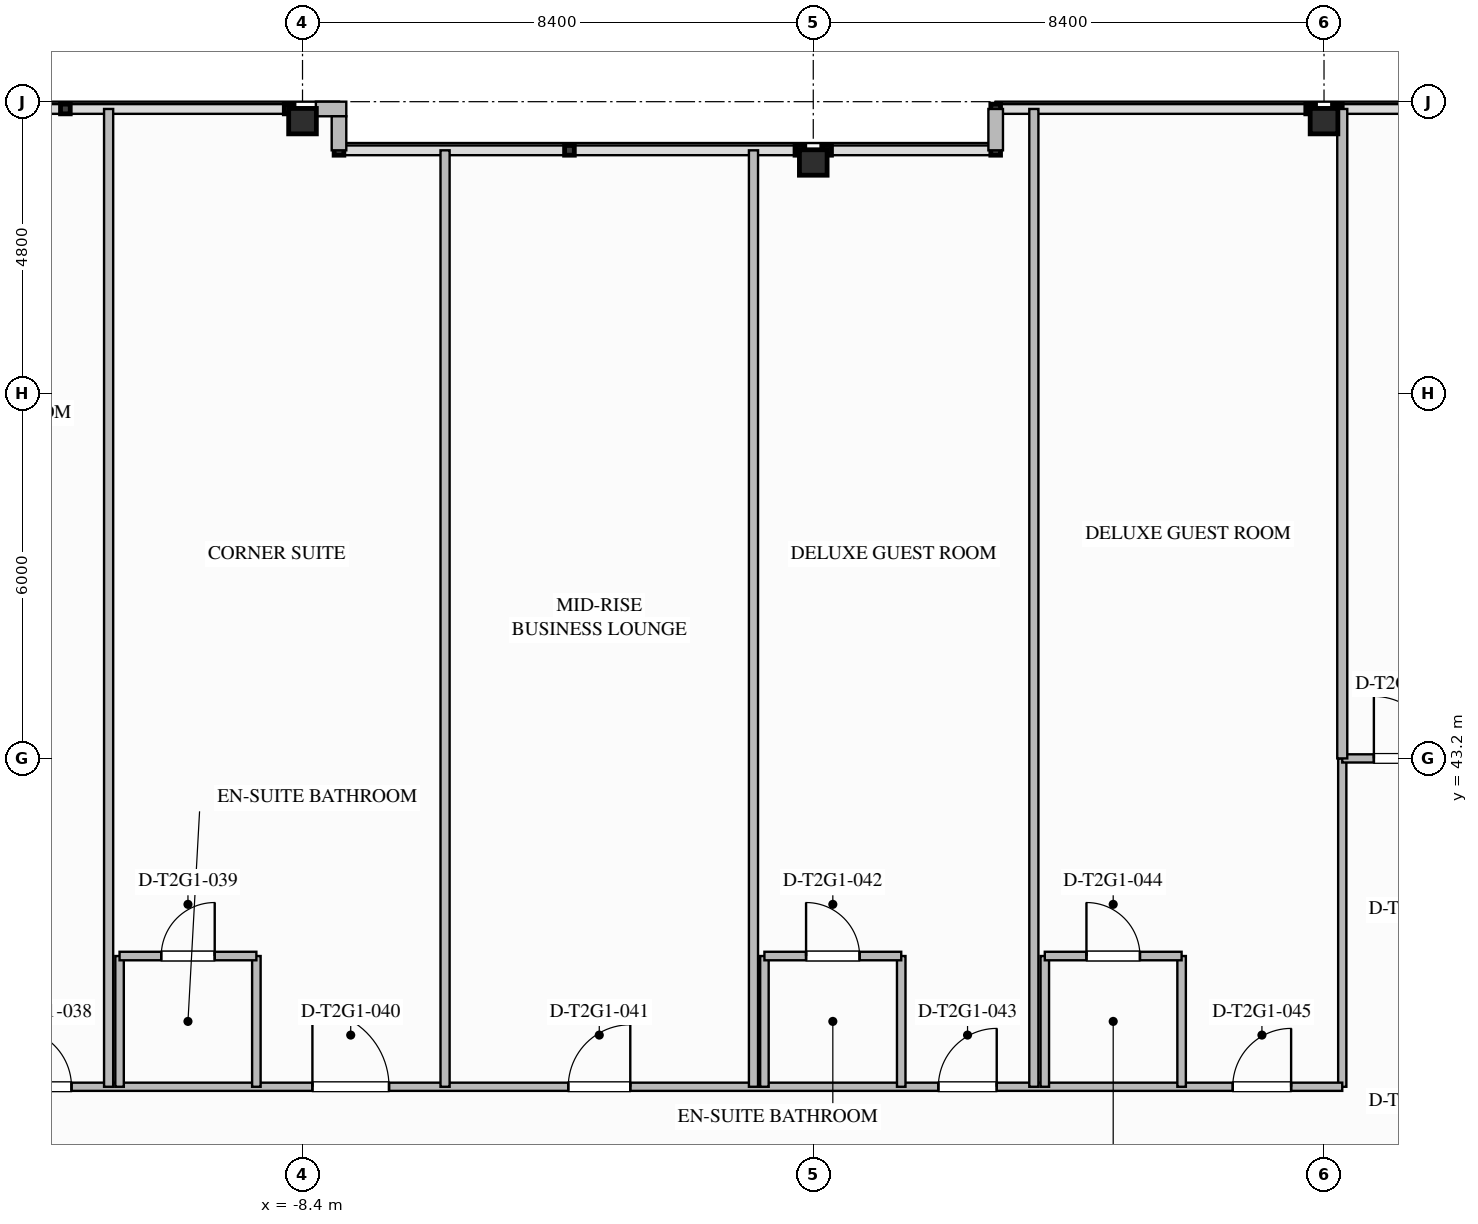
"""IFC4 building model, lengths in metres.
Left out: names, types, materials, properties, quantities, classifications, styles, units other than length and angle.
Written with IfcOpenShell. Run it as: python <this file> out.ifc"""

import sys

from ifc_helpers import new_model, si_unit, direction, frame, frame_2d, origin, origin_2d, place, context, subcontext, project, spatial, rectangle, i_section, extrude, element, fill, save


model = new_model("IFC4")
c1 = context("Model", 3, precision=1e-05, world=origin(), true_north=direction((0.0, 1.0)))
c2 = subcontext(c1, "Body", "Model", "MODEL_VIEW")
j1 = project(units=[si_unit("LENGTHUNIT", "METRE"), si_unit("PLANEANGLEUNIT", "RADIAN")], contexts=[c1])
p1 = place(None, origin())
s1 = spatial("IfcSite", under=j1, at=p1, CompositionType="ELEMENT")
p2 = place(p1, origin())
s2 = spatial("IfcBuilding", under=s1, at=p2, CompositionType="ELEMENT")
p3 = place(p2, frame((0.0, 0.0, 91.8)))
s3 = spatial("IfcBuildingStorey", under=s2, at=p3, CompositionType="ELEMENT", Elevation=91.8)
for number, where, z_axis, x_axis in (
    (1, (-8.4, 53.68, 0.0), (0.0, 0.0, 1.0), (0.0, 1.0, 0.0)),
    (2, (0.0, 53.0, 0.0), (0.0, 0.0, 1.0), (0.0, 1.0, 0.0)),
    (3, (8.4, 53.68, 0.0), (0.0, 0.0, 1.0), (0.0, 1.0, 0.0)),
):
    element("IfcColumn", number, at=place(p3, frame(where, z_axis=z_axis, x_axis=x_axis)), inside=s3, PredefinedType="COLUMN", context=c2, shape_type="SweptSolid", body=[
        extrude(i_section(OverallWidth=0.418, OverallDepth=0.455, WebThickness=0.042, FlangeThickness=0.068, FilletRadius=0.03, at=origin_2d()), origin(), (0.0, 0.0, 1.0), 3.497),
    ])
p4 = place(p3, frame((-8.18, 53.88, 0.0), z_axis=(0.0, 0.0, 1.0), x_axis=(1.0, 0.0, 0.0)))
e4 = element("IfcWall", 4, at=p4, inside=s3, PredefinedType="STANDARD", context=c2, shape_type="SweptSolid", body=[
    extrude(rectangle(XDim=0.5, YDim=0.24, at=frame_2d((0.25, 0.0))), origin(), (0.0, 0.0, 1.0), 3.24),
])
p5 = place(p3, frame((-7.8, 53.76, 0.0), z_axis=(0.0, 0.0, 1.0), x_axis=(0.0, -1.0, 0.0)))
e5 = element("IfcWall", 5, at=p5, inside=s3, PredefinedType="STANDARD", context=c2, shape_type="SweptSolid", body=[
    extrude(rectangle(XDim=0.56, YDim=0.24, at=frame_2d((0.28, 0.0))), origin(), (0.0, 0.0, 1.0), 3.24),
])
p6 = place(p3, frame((3.0, 53.2, 0.0), z_axis=(0.0, 0.0, 1.0), x_axis=(0.0, 1.0, 0.0)))
e6 = element("IfcWall", 6, at=p6, inside=s3, PredefinedType="STANDARD", context=c2, shape_type="SweptSolid", body=[
    extrude(rectangle(XDim=0.68, YDim=0.24, at=frame_2d((0.34, 0.0))), origin(), (0.0, 0.0, 1.0), 3.24),
])
p7 = place(p3, frame((8.7, 37.8, 0.0), z_axis=(0.0, 0.0, 1.0), x_axis=(0.0, 1.0, 0.0)))
e7 = element("IfcWall", 7, at=p7, inside=s3, PredefinedType="PARTITIONING", context=c2, shape_type="SweptSolid", body=[
    extrude(rectangle(XDim=5.4, YDim=0.135, at=frame_2d((2.7, 0.0))), origin(), (0.0, 0.0, 1.0), 3.24),
])
p8 = place(p3, frame((-16.2, 37.8, 0.0), z_axis=(0.0, 0.0, 1.0), x_axis=(1.0, 0.0, 0.0)))
e8 = element("IfcWall", 8, at=p8, inside=s3, PredefinedType="PARTITIONING", context=c2, shape_type="SweptSolid", body=[
    extrude(rectangle(XDim=24.9, YDim=0.135, at=frame_2d((12.45, 0.0))), origin(), (0.0, 0.0, 1.0), 3.24),
])
p9 = place(p8, frame((3.041, 0.0, 0.0)))
e9 = element("IfcOpeningElement", 9, at=p9, cuts=e8, PredefinedType="OPENING", context=c2, shape_type="SweptSolid", body=[
    extrude(rectangle(XDim=0.96, YDim=2.15, at=frame_2d((0.48, 1.075))), frame((0.0, 0.077, 0.0), z_axis=(0.0, -1.0, 0.0), x_axis=(1.0, 0.0, 0.0)), (0.0, 0.0, 1.0), 0.155),
])
p10 = place(p8, frame((7.963, 0.0, 0.0)))
e10 = element("IfcOpeningElement", 10, at=p10, cuts=e8, PredefinedType="OPENING", context=c2, shape_type="SweptSolid", body=[
    extrude(rectangle(XDim=1.26, YDim=2.2, at=frame_2d((0.63, 1.1))), frame((0.0, 0.077, 0.0), z_axis=(0.0, -1.0, 0.0), x_axis=(1.0, 0.0, 0.0)), (0.0, 0.0, 1.0), 0.155),
])
p11 = place(p8, frame((12.171, 0.0, 0.0)))
e11 = element("IfcOpeningElement", 11, at=p11, cuts=e8, PredefinedType="OPENING", context=c2, shape_type="SweptSolid", body=[
    extrude(rectangle(XDim=1.02, YDim=2.15, at=frame_2d((0.51, 1.075))), frame((0.0, 0.077, 0.0), z_axis=(0.0, -1.0, 0.0), x_axis=(1.0, 0.0, 0.0)), (0.0, 0.0, 1.0), 0.155),
])
p12 = place(p8, frame((18.257, 0.0, 0.0)))
e12 = element("IfcOpeningElement", 12, at=p12, cuts=e8, PredefinedType="OPENING", context=c2, shape_type="SweptSolid", body=[
    extrude(rectangle(XDim=0.96, YDim=2.15, at=frame_2d((0.48, 1.075))), frame((0.0, 0.077, 0.0), z_axis=(0.0, -1.0, 0.0), x_axis=(1.0, 0.0, 0.0)), (0.0, 0.0, 1.0), 0.155),
])
p13 = place(p8, frame((23.099, 0.0, 0.0)))
e13 = element("IfcOpeningElement", 13, at=p13, cuts=e8, PredefinedType="OPENING", context=c2, shape_type="SweptSolid", body=[
    extrude(rectangle(XDim=0.96, YDim=2.15, at=frame_2d((0.48, 1.075))), frame((0.0, 0.077, 0.0), z_axis=(0.0, -1.0, 0.0), x_axis=(1.0, 0.0, 0.0)), (0.0, 0.0, 1.0), 0.155),
])
p14 = place(p3, frame((8.7, 43.2, 0.0), z_axis=(0.0, 0.0, 1.0), x_axis=(1.0, 0.0, 0.0)))
e14 = element("IfcWall", 14, at=p14, inside=s3, PredefinedType="PARTITIONING", context=c2, shape_type="SweptSolid", body=[
    extrude(rectangle(XDim=2.1, YDim=0.135, at=frame_2d((1.05, 0.0))), origin(), (0.0, 0.0, 1.0), 2.452),
])
p15 = place(p14, frame((0.52, 0.0, 0.0)))
e15 = element("IfcOpeningElement", 15, at=p15, cuts=e14, PredefinedType="OPENING", context=c2, shape_type="SweptSolid", body=[
    extrude(rectangle(XDim=1.02, YDim=2.15, at=frame_2d((0.51, 1.075))), frame((0.0, 0.077, 0.0), z_axis=(0.0, -1.0, 0.0), x_axis=(1.0, 0.0, 0.0)), (0.0, 0.0, 1.0), 0.155),
])
p16 = place(p3, frame((8.7, 43.2, 0.0), z_axis=(0.0, 0.0, 1.0), x_axis=(0.0, 1.0, 0.0)))
e16 = element("IfcWall", 16, at=p16, inside=s3, PredefinedType="PARTITIONING", context=c2, shape_type="SweptSolid", body=[
    extrude(rectangle(XDim=10.68, YDim=0.165, at=frame_2d((5.34, 0.0))), origin(), (0.0, 0.0, 1.0), 2.452),
])
p17 = place(p3, frame((-11.589, 37.8, 0.0), z_axis=(0.0, 0.0, 1.0), x_axis=(0.0, 1.0, 0.0)))
e17 = element("IfcWall", 17, at=p17, inside=s3, PredefinedType="PARTITIONING", context=c2, shape_type="SweptSolid", body=[
    extrude(rectangle(XDim=16.08, YDim=0.15, at=frame_2d((8.04, 0.0))), origin(), (0.0, 0.0, 1.0), 3.24),
])
for number, where, z_axis, x_axis in (
    (18, (-11.409, 37.8, 0.0), (0.0, 0.0, 1.0), (0.0, 1.0, 0.0)),
    (19, (-9.159, 37.8, 0.0), (0.0, 0.0, 1.0), (0.0, 1.0, 0.0)),
):
    element("IfcWall", number, at=place(p3, frame(where, z_axis=z_axis, x_axis=x_axis)), inside=s3, PredefinedType="PLUMBINGWALL", context=c2, shape_type="SweptSolid", body=[
        extrude(rectangle(XDim=2.15, YDim=0.14, at=frame_2d((1.075, 0.0))), origin(), (0.0, 0.0, 1.0), 3.24),
    ])
p18 = place(p3, frame((-11.409, 39.95, 0.0), z_axis=(0.0, 0.0, 1.0), x_axis=(1.0, 0.0, 0.0)))
e20 = element("IfcWall", 20, at=p18, inside=s3, PredefinedType="PLUMBINGWALL", context=c2, shape_type="SweptSolid", body=[
    extrude(rectangle(XDim=2.25, YDim=0.14, at=frame_2d((1.125, 0.0))), origin(), (0.0, 0.0, 1.0), 3.24),
])
p19 = place(p18, frame((0.685, 0.0, 0.0)))
e21 = element("IfcOpeningElement", 21, at=p19, cuts=e20, PredefinedType="OPENING", context=c2, shape_type="SweptSolid", body=[
    extrude(rectangle(XDim=0.88, YDim=2.1, at=frame_2d((0.44, 1.05))), frame((0.0, 0.08, 0.0), z_axis=(0.0, -1.0, 0.0), x_axis=(1.0, 0.0, 0.0)), (0.0, 0.0, 1.0), 0.16),
])
for number, where, z_axis, x_axis in (
    (22, (-6.056, 37.8, 0.0), (0.0, 0.0, 1.0), (0.0, 1.0, 0.0)),
    (23, (-0.983, 37.8, 0.0), (0.0, 0.0, 1.0), (0.0, 1.0, 0.0)),
):
    element("IfcWall", number, at=place(p3, frame(where, z_axis=z_axis, x_axis=x_axis)), inside=s3, PredefinedType="PARTITIONING", context=c2, shape_type="SweptSolid", body=[
        extrude(rectangle(XDim=15.4, YDim=0.15, at=frame_2d((7.7, 0.0))), origin(), (0.0, 0.0, 1.0), 3.24),
    ])
for number, where, z_axis, x_axis in (
    (24, (-0.803, 37.8, 0.0), (0.0, 0.0, 1.0), (0.0, 1.0, 0.0)),
    (25, (1.447, 37.8, 0.0), (0.0, 0.0, 1.0), (0.0, 1.0, 0.0)),
):
    element("IfcWall", number, at=place(p3, frame(where, z_axis=z_axis, x_axis=x_axis)), inside=s3, PredefinedType="PLUMBINGWALL", context=c2, shape_type="SweptSolid", body=[
        extrude(rectangle(XDim=2.15, YDim=0.14, at=frame_2d((1.075, 0.0))), origin(), (0.0, 0.0, 1.0), 3.24),
    ])
p20 = place(p3, frame((-0.803, 39.95, 0.0), z_axis=(0.0, 0.0, 1.0), x_axis=(1.0, 0.0, 0.0)))
e26 = element("IfcWall", 26, at=p20, inside=s3, PredefinedType="PLUMBINGWALL", context=c2, shape_type="SweptSolid", body=[
    extrude(rectangle(XDim=2.25, YDim=0.14, at=frame_2d((1.125, 0.0))), origin(), (0.0, 0.0, 1.0), 3.24),
])
p21 = place(p20, frame((0.685, 0.0, 0.0)))
e27 = element("IfcOpeningElement", 27, at=p21, cuts=e26, PredefinedType="OPENING", context=c2, shape_type="SweptSolid", body=[
    extrude(rectangle(XDim=0.88, YDim=2.1, at=frame_2d((0.44, 1.05))), frame((0.0, 0.08, 0.0), z_axis=(0.0, -1.0, 0.0), x_axis=(1.0, 0.0, 0.0)), (0.0, 0.0, 1.0), 0.16),
])
p22 = place(p3, frame((3.628, 37.8, 0.0), z_axis=(0.0, 0.0, 1.0), x_axis=(0.0, 1.0, 0.0)))
e28 = element("IfcWall", 28, at=p22, inside=s3, PredefinedType="PARTITIONING", context=c2, shape_type="SweptSolid", body=[
    extrude(rectangle(XDim=16.08, YDim=0.15, at=frame_2d((8.04, 0.0))), origin(), (0.0, 0.0, 1.0), 3.24),
])
for number, where, z_axis, x_axis in (
    (29, (3.808, 37.8, 0.0), (0.0, 0.0, 1.0), (0.0, 1.0, 0.0)),
    (30, (6.058, 37.8, 0.0), (0.0, 0.0, 1.0), (0.0, 1.0, 0.0)),
):
    element("IfcWall", number, at=place(p3, frame(where, z_axis=z_axis, x_axis=x_axis)), inside=s3, PredefinedType="PLUMBINGWALL", context=c2, shape_type="SweptSolid", body=[
        extrude(rectangle(XDim=2.15, YDim=0.14, at=frame_2d((1.075, 0.0))), origin(), (0.0, 0.0, 1.0), 3.24),
    ])
p23 = place(p3, frame((3.808, 39.95, 0.0), z_axis=(0.0, 0.0, 1.0), x_axis=(1.0, 0.0, 0.0)))
e31 = element("IfcWall", 31, at=p23, inside=s3, PredefinedType="PLUMBINGWALL", context=c2, shape_type="SweptSolid", body=[
    extrude(rectangle(XDim=2.25, YDim=0.14, at=frame_2d((1.125, 0.0))), origin(), (0.0, 0.0, 1.0), 3.24),
])
p24 = place(p23, frame((0.685, 0.0, 0.0)))
e32 = element("IfcOpeningElement", 32, at=p24, cuts=e31, PredefinedType="OPENING", context=c2, shape_type="SweptSolid", body=[
    extrude(rectangle(XDim=0.88, YDim=2.1, at=frame_2d((0.44, 1.05))), frame((0.0, 0.08, 0.0), z_axis=(0.0, -1.0, 0.0), x_axis=(1.0, 0.0, 0.0)), (0.0, 0.0, 1.0), 0.16),
])
p25 = place(p15, origin())
e33 = element("IfcDoor", 33, at=p25, inside=s3, OperationType="SINGLE_SWING_LEFT", PredefinedType="DOOR", context=c2, shape_type="SweptSolid", body=[
    extrude(rectangle(XDim=1.02, YDim=2.15, at=frame_2d((0.51, 1.075))), frame((0.0, 0.025, 0.0), z_axis=(0.0, -1.0, 0.0), x_axis=(1.0, 0.0, 0.0)), (0.0, 0.0, 1.0), 0.05),
])
fill(e15, e33)
p26 = place(p9, origin())
e34 = element("IfcDoor", 34, at=p26, inside=s3, OperationType="SINGLE_SWING_LEFT", PredefinedType="DOOR", context=c2, shape_type="SweptSolid", body=[
    extrude(rectangle(XDim=0.96, YDim=2.15, at=frame_2d((0.48, 1.075))), frame((0.0, 0.025, 0.0), z_axis=(0.0, -1.0, 0.0), x_axis=(1.0, 0.0, 0.0)), (0.0, 0.0, 1.0), 0.05),
])
fill(e9, e34)
p27 = place(p19, origin())
e35 = element("IfcDoor", 35, at=p27, inside=s3, OperationType="SINGLE_SWING_RIGHT", PredefinedType="DOOR", context=c2, shape_type="SweptSolid", body=[
    extrude(rectangle(XDim=0.88, YDim=2.1, at=frame_2d((0.44, 1.05))), frame((0.0, 0.025, 0.0), z_axis=(0.0, -1.0, 0.0), x_axis=(1.0, 0.0, 0.0)), (0.0, 0.0, 1.0), 0.05),
])
fill(e21, e35)
p28 = place(p10, origin())
e36 = element("IfcDoor", 36, at=p28, inside=s3, OperationType="SINGLE_SWING_LEFT", PredefinedType="DOOR", context=c2, shape_type="SweptSolid", body=[
    extrude(rectangle(XDim=1.26, YDim=2.2, at=frame_2d((0.63, 1.1))), frame((0.0, 0.025, 0.0), z_axis=(0.0, -1.0, 0.0), x_axis=(1.0, 0.0, 0.0)), (0.0, 0.0, 1.0), 0.05),
])
fill(e10, e36)
p29 = place(p11, origin())
e37 = element("IfcDoor", 37, at=p29, inside=s3, OperationType="SINGLE_SWING_RIGHT", PredefinedType="DOOR", context=c2, shape_type="SweptSolid", body=[
    extrude(rectangle(XDim=1.02, YDim=2.15, at=frame_2d((0.51, 1.075))), frame((0.0, 0.025, 0.0), z_axis=(0.0, -1.0, 0.0), x_axis=(1.0, 0.0, 0.0)), (0.0, 0.0, 1.0), 0.05),
])
fill(e11, e37)
p30 = place(p21, origin())
e38 = element("IfcDoor", 38, at=p30, inside=s3, OperationType="SINGLE_SWING_LEFT", PredefinedType="DOOR", context=c2, shape_type="SweptSolid", body=[
    extrude(rectangle(XDim=0.88, YDim=2.1, at=frame_2d((0.44, 1.05))), frame((0.0, 0.025, 0.0), z_axis=(0.0, -1.0, 0.0), x_axis=(1.0, 0.0, 0.0)), (0.0, 0.0, 1.0), 0.05),
])
fill(e27, e38)
p31 = place(p12, origin())
e39 = element("IfcDoor", 39, at=p31, inside=s3, OperationType="SINGLE_SWING_RIGHT", PredefinedType="DOOR", context=c2, shape_type="SweptSolid", body=[
    extrude(rectangle(XDim=0.96, YDim=2.15, at=frame_2d((0.48, 1.075))), frame((0.0, 0.025, 0.0), z_axis=(0.0, -1.0, 0.0), x_axis=(1.0, 0.0, 0.0)), (0.0, 0.0, 1.0), 0.05),
])
fill(e12, e39)
p32 = place(p24, origin())
e40 = element("IfcDoor", 40, at=p32, inside=s3, OperationType="SINGLE_SWING_LEFT", PredefinedType="DOOR", context=c2, shape_type="SweptSolid", body=[
    extrude(rectangle(XDim=0.88, YDim=2.1, at=frame_2d((0.44, 1.05))), frame((0.0, 0.025, 0.0), z_axis=(0.0, -1.0, 0.0), x_axis=(1.0, 0.0, 0.0)), (0.0, 0.0, 1.0), 0.05),
])
fill(e32, e40)
p33 = place(p13, origin())
e41 = element("IfcDoor", 41, at=p33, inside=s3, OperationType="SINGLE_SWING_RIGHT", PredefinedType="DOOR", context=c2, shape_type="SweptSolid", body=[
    extrude(rectangle(XDim=0.96, YDim=2.15, at=frame_2d((0.48, 1.075))), frame((0.0, 0.025, 0.0), z_axis=(0.0, -1.0, 0.0), x_axis=(1.0, 0.0, 0.0)), (0.0, 0.0, 1.0), 0.05),
])
fill(e13, e41)
save(model, sys.argv[1])
